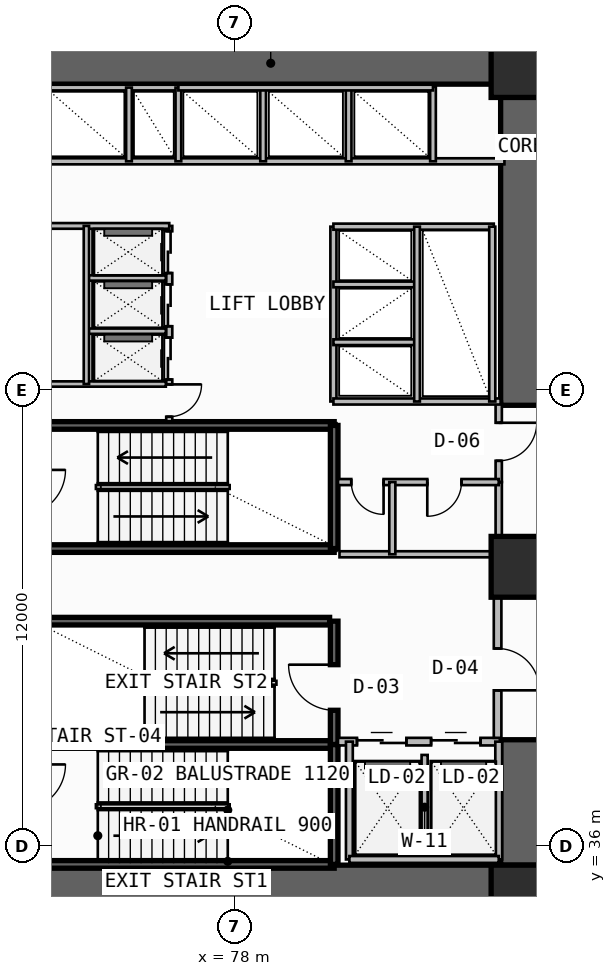
"""IFC4 building model, lengths in metres.
Left out: names, types, materials, properties, quantities, classifications, styles, units other than length and angle.
Written with IfcOpenShell. Run it as: python <this file> out.ifc"""

import sys

from ifc_helpers import new_model, si_unit, direction, frame, frame_2d, origin, origin_2d, place, context, subcontext, project, spatial, rectangle, extrude, element, fill, save


model = new_model("IFC4")
c1 = context("Model", 3, precision=1e-05, world=origin(), true_north=direction((0.0, 1.0)))
c2 = subcontext(c1, "Body", "Model", "MODEL_VIEW")
j1 = project(units=[si_unit("LENGTHUNIT", "METRE"), si_unit("PLANEANGLEUNIT", "RADIAN")], contexts=[c1])
p1 = place(None, origin())
s1 = spatial("IfcSite", under=j1, at=p1, CompositionType="ELEMENT")
p2 = place(p1, origin())
s2 = spatial("IfcBuilding", under=s1, at=p2, CompositionType="ELEMENT")
p3 = place(p2, frame((0.0, 0.0, 4.5)))
s3 = spatial("IfcBuildingStorey", under=s2, at=p3, CompositionType="ELEMENT", Elevation=4.5)
p4 = place(p3, frame((71.8, 34.95, -0.32), z_axis=(0.0, 0.0, 1.0), x_axis=(1.0, 0.0, 0.0)))
e1 = element("IfcWall", 1, at=p4, inside=s3, PredefinedType="SHEAR", context=c2, shape_type="SweptSolid", body=[
    extrude(rectangle(XDim=14.3, YDim=1.1, at=frame_2d((7.15, 0.0))), origin(), (0.0, 0.0, 1.0), 4.5),
])
p5 = place(p3, frame((85.55, 35.5, -0.32), z_axis=(0.0, 0.0, 1.0), x_axis=(0.0, 1.0, 0.0)))
e2 = element("IfcWall", 2, at=p5, inside=s3, PredefinedType="SHEAR", context=c2, shape_type="SweptSolid", body=[
    extrude(rectangle(XDim=3.3, YDim=1.1, at=frame_2d((1.65, 0.0))), origin(), (0.0, 0.0, 1.0), 4.5),
])
p6 = place(p3, frame((71.8, 56.6, -0.32), z_axis=(0.0, 0.0, 1.0), x_axis=(1.0, 0.0, 0.0)))
e3 = element("IfcWall", 3, at=p6, inside=s3, PredefinedType="SHEAR", context=c2, shape_type="SweptSolid", body=[
    extrude(rectangle(XDim=14.3, YDim=1.1, at=frame_2d((7.15, 0.0))), origin(), (0.0, 0.0, 1.0), 4.5),
])
p7 = place(p3, frame((85.55, 47.6, -0.32), z_axis=(0.0, 0.0, 1.0), x_axis=(0.0, 1.0, 0.0)))
e4 = element("IfcWall", 4, at=p7, inside=s3, PredefinedType="SHEAR", context=c2, shape_type="SweptSolid", body=[
    extrude(rectangle(XDim=8.45, YDim=1.1, at=frame_2d((4.225, 0.0))), origin(), (0.0, 0.0, 1.0), 4.5),
])
for number, where, z_axis, x_axis in (
    (5, (85.55, 34.7, 0.0), (0.0, 0.0, 1.0), (1.0, 0.0, 0.0)),
    (6, (85.55, 43.35, 0.0), (0.0, 0.0, 1.0), (1.0, 0.0, 0.0)),
    (7, (85.55, 56.5, 0.0), (0.0, 0.0, 1.0), (1.0, 0.0, 0.0)),
):
    element("IfcColumn", number, at=place(p3, frame(where, z_axis=z_axis, x_axis=x_axis)), inside=s3, PredefinedType="COLUMN", context=c2, shape_type="SweptSolid", body=[
        extrude(rectangle(XDim=1.6, YDim=1.6, at=origin_2d()), origin(), (0.0, 0.0, 1.0), 4.5),
    ])
for number, where, z_axis, x_axis in (
    (8, (72.92, 35.52, -0.32), (0.0, 0.0, 1.0), (1.0, 0.0, 0.0)),
    (9, (72.92, 38.675, -0.32), (0.0, 0.0, 1.0), (1.0, 0.0, 0.0)),
):
    element("IfcWall", number, at=place(p3, frame(where, z_axis=z_axis, x_axis=x_axis)), inside=s3, PredefinedType="SOLIDWALL", context=c2, shape_type="SweptSolid", body=[
        extrude(rectangle(XDim=7.7, YDim=0.2, at=frame_2d((3.85, 0.0))), origin(), (0.0, 0.0, 1.0), 4.5),
    ])
p8 = place(p3, frame((80.62, 35.52, -0.32), z_axis=(0.0, 0.0, 1.0), x_axis=(0.0, 1.0, 0.0)))
e10 = element("IfcWall", 10, at=p8, inside=s3, PredefinedType="SOLIDWALL", context=c2, shape_type="SweptSolid", body=[
    extrude(rectangle(XDim=3.155, YDim=0.2, at=frame_2d((1.578, 0.0))), origin(), (0.0, 0.0, 1.0), 4.5),
])
p9 = place(p3, frame((80.62, 38.675, -0.32), z_axis=(0.0, 0.0, 1.0), x_axis=(0.0, 1.0, 0.0)))
e11 = element("IfcWall", 11, at=p9, inside=s3, PredefinedType="SOLIDWALL", context=c2, shape_type="SweptSolid", body=[
    extrude(rectangle(XDim=3.245, YDim=0.2, at=frame_2d((1.623, 0.0))), origin(), (0.0, 0.0, 1.0), 4.5),
])
p10 = place(p9, frame((0.9, 0.0, 0.32)))
e12 = element("IfcOpeningElement", 12, at=p10, cuts=e11, PredefinedType="OPENING", context=c2, shape_type="SweptSolid", body=[
    extrude(rectangle(XDim=1.2, YDim=2.2, at=frame_2d((0.6, 1.1))), frame((0.0, 0.11, 0.0), z_axis=(0.0, -1.0, 0.0), x_axis=(1.0, 0.0, 0.0)), (0.0, 0.0, 1.0), 0.22),
])
p11 = place(p3, frame((80.72, 38.75, 0.0), z_axis=(0.0, 0.0, 1.0), x_axis=(1.0, 0.0, 0.0)))
e13 = element("IfcWall", 13, at=p11, inside=s3, PredefinedType="SOLIDWALL", context=c2, shape_type="SweptSolid", body=[
    extrude(rectangle(XDim=4.26, YDim=0.2, at=frame_2d((2.13, 0.0))), origin(), (0.0, 0.0, 1.0), 4.18),
])
p12 = place(p11, frame((0.5, 0.0, 0.0)))
e14 = element("IfcOpeningElement", 14, at=p12, cuts=e13, PredefinedType="OPENING", context=c2, shape_type="SweptSolid", body=[
    extrude(rectangle(XDim=1.3, YDim=2.3, at=frame_2d((0.65, 1.15))), frame((0.0, 0.11, 0.0), z_axis=(0.0, -1.0, 0.0), x_axis=(1.0, 0.0, 0.0)), (0.0, 0.0, 1.0), 0.22),
])
p13 = place(p11, frame((2.45, 0.0, 0.0)))
e15 = element("IfcOpeningElement", 15, at=p13, cuts=e13, PredefinedType="OPENING", context=c2, shape_type="SweptSolid", body=[
    extrude(rectangle(XDim=1.3, YDim=2.3, at=frame_2d((0.65, 1.15))), frame((0.0, 0.11, 0.0), z_axis=(0.0, -1.0, 0.0), x_axis=(1.0, 0.0, 0.0)), (0.0, 0.0, 1.0), 0.22),
])
p14 = place(p3, frame((83.0, 35.65, 0.0), z_axis=(0.0, 0.0, 1.0), x_axis=(0.0, 1.0, 0.0)))
e16 = element("IfcWall", 16, at=p14, inside=s3, PredefinedType="PLUMBINGWALL", context=c2, shape_type="SweptSolid", body=[
    extrude(rectangle(XDim=2.75, YDim=0.16, at=frame_2d((1.375, 0.0))), origin(), (0.0, 0.0, 1.0), 4.18),
])
for number, where, z_axis, x_axis in (
    (17, (84.95, 35.65, 0.0), (0.0, 0.0, 1.0), (0.0, 1.0, 0.0)),
    (18, (81.02, 35.65, 0.0), (0.0, 0.0, 1.0), (0.0, 1.0, 0.0)),
):
    element("IfcWall", number, at=place(p3, frame(where, z_axis=z_axis, x_axis=x_axis)), inside=s3, PredefinedType="SOLIDWALL", context=c2, shape_type="SweptSolid", body=[
        extrude(rectangle(XDim=3.1, YDim=0.18, at=frame_2d((1.55, 0.0))), origin(), (0.0, 0.0, 1.0), 4.18),
    ])
p15 = place(p3, frame((81.02, 35.65, 0.0), z_axis=(0.0, 0.0, 1.0), x_axis=(1.0, 0.0, 0.0)))
e19 = element("IfcWall", 19, at=p15, inside=s3, PredefinedType="SOLIDWALL", context=c2, shape_type="SweptSolid", body=[
    extrude(rectangle(XDim=3.93, YDim=0.18, at=frame_2d((1.965, 0.0))), origin(), (0.0, 0.0, 1.0), 4.18),
])
p16 = place(p3, frame((84.92, 38.85, 0.0), z_axis=(0.0, 0.0, 1.0), x_axis=(0.0, 1.0, 0.0)))
e20 = element("IfcWall", 20, at=p16, inside=s3, PredefinedType="SOLIDWALL", context=c2, shape_type="SweptSolid", body=[
    extrude(rectangle(XDim=4.83, YDim=0.2, at=frame_2d((2.415, 0.0))), origin(), (0.0, 0.0, 1.0), 4.18),
])
p17 = place(p16, frame((1.25, 0.0, 0.0)))
e21 = element("IfcOpeningElement", 21, at=p17, cuts=e20, PredefinedType="OPENING", context=c2, shape_type="SweptSolid", body=[
    extrude(rectangle(XDim=1.1, YDim=2.2, at=frame_2d((0.55, 1.1))), frame((0.0, 0.11, 0.0), z_axis=(0.0, -1.0, 0.0), x_axis=(1.0, 0.0, 0.0)), (0.0, 0.0, 1.0), 0.22),
])
p18 = place(p3, frame((72.92, 41.92, -0.32), z_axis=(0.0, 0.0, 1.0), x_axis=(1.0, 0.0, 0.0)))
e22 = element("IfcWall", 22, at=p18, inside=s3, PredefinedType="SOLIDWALL", context=c2, shape_type="SweptSolid", body=[
    extrude(rectangle(XDim=7.58, YDim=0.2, at=frame_2d((3.79, 0.0))), origin(), (0.0, 0.0, 1.0), 4.5),
])
for number, where, z_axis, x_axis in (
    (23, (72.92, 43.83, -0.32), (0.0, 0.0, 1.0), (1.0, 0.0, 0.0)),
    (24, (72.92, 47.07, -0.32), (0.0, 0.0, 1.0), (1.0, 0.0, 0.0)),
):
    element("IfcWall", number, at=place(p3, frame(where, z_axis=z_axis, x_axis=x_axis)), inside=s3, PredefinedType="SOLIDWALL", context=c2, shape_type="SweptSolid", body=[
        extrude(rectangle(XDim=7.7, YDim=0.2, at=frame_2d((3.85, 0.0))), origin(), (0.0, 0.0, 1.0), 4.5),
    ])
p19 = place(p3, frame((80.62, 43.83, -0.32), z_axis=(0.0, 0.0, 1.0), x_axis=(0.0, 1.0, 0.0)))
e25 = element("IfcWall", 25, at=p19, inside=s3, PredefinedType="SOLIDWALL", context=c2, shape_type="SweptSolid", body=[
    extrude(rectangle(XDim=3.24, YDim=0.2, at=frame_2d((1.62, 0.0))), origin(), (0.0, 0.0, 1.0), 4.5),
])
p20 = place(p3, frame((84.95, 43.68, 0.0), z_axis=(0.0, 0.0, 1.0), x_axis=(0.0, 1.0, 0.0)))
e26 = element("IfcWall", 26, at=p20, inside=s3, PredefinedType="PLUMBINGWALL", context=c2, shape_type="SweptSolid", body=[
    extrude(rectangle(XDim=1.9, YDim=0.165, at=frame_2d((0.95, 0.0))), origin(), (0.0, 0.0, 1.0), 4.18),
])
p21 = place(p3, frame((84.95, 45.58, 0.0), z_axis=(0.0, 0.0, 1.0), x_axis=(0.0, 1.0, 0.0)))
e27 = element("IfcWall", 27, at=p21, inside=s3, PredefinedType="PARTITIONING", context=c2, shape_type="SweptSolid", body=[
    extrude(rectangle(XDim=2.12, YDim=0.165, at=frame_2d((1.06, 0.0))), origin(), (0.0, 0.0, 1.0), 4.18),
])
p22 = place(p21, frame((0.56, 0.0, 0.0)))
e28 = element("IfcOpeningElement", 28, at=p22, cuts=e27, PredefinedType="OPENING", context=c2, shape_type="SweptSolid", body=[
    extrude(rectangle(XDim=1.0, YDim=2.2, at=frame_2d((0.5, 1.1))), frame((0.0, 0.093, 0.0), z_axis=(0.0, -1.0, 0.0), x_axis=(1.0, 0.0, 0.0)), (0.0, 0.0, 1.0), 0.185),
])
p23 = place(p3, frame((80.72, 45.58, 0.0), z_axis=(0.0, 0.0, 1.0), x_axis=(1.0, 0.0, 0.0)))
e29 = element("IfcWall", 29, at=p23, inside=s3, PredefinedType="PLUMBINGWALL", context=c2, shape_type="SweptSolid", body=[
    extrude(rectangle(XDim=4.23, YDim=0.16, at=frame_2d((2.115, 0.0))), origin(), (0.0, 0.0, 1.0), 4.18),
])
p24 = place(p23, frame((0.35, 0.0, 0.0)))
e30 = element("IfcOpeningElement", 30, at=p24, cuts=e29, PredefinedType="OPENING", context=c2, shape_type="SweptSolid", body=[
    extrude(rectangle(XDim=0.85, YDim=2.05, at=frame_2d((0.425, 1.025))), frame((0.0, 0.09, 0.0), z_axis=(0.0, -1.0, 0.0), x_axis=(1.0, 0.0, 0.0)), (0.0, 0.0, 1.0), 0.18),
])
p25 = place(p23, frame((2.35, 0.0, 0.0)))
e31 = element("IfcOpeningElement", 31, at=p25, cuts=e29, PredefinedType="OPENING", context=c2, shape_type="SweptSolid", body=[
    extrude(rectangle(XDim=0.9, YDim=2.1, at=frame_2d((0.45, 1.05))), frame((0.0, 0.09, 0.0), z_axis=(0.0, -1.0, 0.0), x_axis=(1.0, 0.0, 0.0)), (0.0, 0.0, 1.0), 0.18),
])
p26 = place(p3, frame((80.76, 43.68, 0.0), z_axis=(0.0, 0.0, 1.0), x_axis=(1.0, 0.0, 0.0)))
e32 = element("IfcWall", 32, at=p26, inside=s3, PredefinedType="PLUMBINGWALL", context=c2, shape_type="SweptSolid", body=[
    extrude(rectangle(XDim=4.19, YDim=0.16, at=frame_2d((2.095, 0.0))), origin(), (0.0, 0.0, 1.0), 4.18),
])
p27 = place(p3, frame((82.15, 43.68, 0.0), z_axis=(0.0, 0.0, 1.0), x_axis=(0.0, 1.0, 0.0)))
e33 = element("IfcWall", 33, at=p27, inside=s3, PredefinedType="PLUMBINGWALL", context=c2, shape_type="SweptSolid", body=[
    extrude(rectangle(XDim=1.9, YDim=0.16, at=frame_2d((0.95, 0.0))), origin(), (0.0, 0.0, 1.0), 4.18),
])
p28 = place(p3, frame((76.28, 47.18, 0.0), z_axis=(0.0, 0.0, 1.0), x_axis=(0.0, 1.0, 0.0)))
e34 = element("IfcWall", 34, at=p28, inside=s3, PredefinedType="SOLIDWALL", context=c2, shape_type="SweptSolid", body=[
    extrude(rectangle(XDim=5.14, YDim=0.16, at=frame_2d((2.57, 0.0))), origin(), (0.0, 0.0, 1.0), 4.18),
])
p29 = place(p28, frame((1.1, 0.0, 0.0)))
e35 = element("IfcOpeningElement", 35, at=p29, cuts=e34, PredefinedType="OPENING", context=c2, shape_type="SweptSolid", body=[
    extrude(rectangle(XDim=1.1, YDim=2.25, at=frame_2d((0.55, 1.125))), frame((0.0, 0.09, 0.0), z_axis=(0.0, -1.0, 0.0), x_axis=(1.0, 0.0, 0.0)), (0.0, 0.0, 1.0), 0.18),
])
p30 = place(p28, frame((2.5, 0.0, 0.0)))
e36 = element("IfcOpeningElement", 36, at=p30, cuts=e34, PredefinedType="OPENING", context=c2, shape_type="SweptSolid", body=[
    extrude(rectangle(XDim=1.1, YDim=2.25, at=frame_2d((0.55, 1.125))), frame((0.0, 0.09, 0.0), z_axis=(0.0, -1.0, 0.0), x_axis=(1.0, 0.0, 0.0)), (0.0, 0.0, 1.0), 0.18),
])
p31 = place(p28, frame((3.9, 0.0, 0.0)))
e37 = element("IfcOpeningElement", 37, at=p31, cuts=e34, PredefinedType="OPENING", context=c2, shape_type="SweptSolid", body=[
    extrude(rectangle(XDim=1.1, YDim=2.25, at=frame_2d((0.55, 1.125))), frame((0.0, 0.09, 0.0), z_axis=(0.0, -1.0, 0.0), x_axis=(1.0, 0.0, 0.0)), (0.0, 0.0, 1.0), 0.18),
])
p32 = place(p28, frame((0.12, 0.0, 0.0)))
e38 = element("IfcOpeningElement", 38, at=p32, cuts=e34, PredefinedType="OPENING", context=c2, shape_type="SweptSolid", body=[
    extrude(rectangle(XDim=0.85, YDim=2.05, at=frame_2d((0.425, 1.025))), frame((0.0, 0.09, 0.0), z_axis=(0.0, -1.0, 0.0), x_axis=(1.0, 0.0, 0.0)), (0.0, 0.0, 1.0), 0.18),
])
p33 = place(p3, frame((72.95, 52.32, 0.0), z_axis=(0.0, 0.0, 1.0), x_axis=(1.0, 0.0, 0.0)))
e39 = element("IfcWall", 39, at=p33, inside=s3, PredefinedType="SOLIDWALL", context=c2, shape_type="SweptSolid", body=[
    extrude(rectangle(XDim=3.33, YDim=0.15, at=frame_2d((1.665, 0.0))), origin(), (0.0, 0.0, 1.0), 4.18),
])
p34 = place(p3, frame((72.95, 48.16, 0.0), z_axis=(0.0, 0.0, 1.0), x_axis=(1.0, 0.0, 0.0)))
e40 = element("IfcWall", 40, at=p34, inside=s3, PredefinedType="PLUMBINGWALL", context=c2, shape_type="SweptSolid", body=[
    extrude(rectangle(XDim=3.24, YDim=0.14, at=frame_2d((1.62, 0.0))), origin(), (0.0, 0.0, 1.0), 4.18),
])
for number, where, z_axis, x_axis in (
    (41, (74.15, 49.55, 0.0), (0.0, 0.0, 1.0), (1.0, 0.0, 0.0)),
    (42, (74.15, 50.95, 0.0), (0.0, 0.0, 1.0), (1.0, 0.0, 0.0)),
):
    element("IfcWall", number, at=place(p3, frame(where, z_axis=z_axis, x_axis=x_axis)), inside=s3, PredefinedType="PLUMBINGWALL", context=c2, shape_type="SweptSolid", body=[
        extrude(rectangle(XDim=2.04, YDim=0.14, at=frame_2d((1.02, 0.0))), origin(), (0.0, 0.0, 1.0), 4.18),
    ])
p35 = place(p3, frame((74.1, 48.16, 0.0), z_axis=(0.0, 0.0, 1.0), x_axis=(0.0, 1.0, 0.0)))
e43 = element("IfcWall", 43, at=p35, inside=s3, PredefinedType="PLUMBINGWALL", context=c2, shape_type="SweptSolid", body=[
    extrude(rectangle(XDim=4.16, YDim=0.14, at=frame_2d((2.08, 0.0))), origin(), (0.0, 0.0, 1.0), 4.18),
])
p36 = place(p3, frame((80.6, 47.7, 0.0), z_axis=(0.0, 0.0, 1.0), x_axis=(0.0, 1.0, 0.0)))
e44 = element("IfcWall", 44, at=p36, inside=s3, PredefinedType="SOLIDWALL", context=c2, shape_type="SweptSolid", body=[
    extrude(rectangle(XDim=4.6, YDim=0.16, at=frame_2d((2.3, 0.0))), origin(), (0.0, 0.0, 1.0), 4.18),
])
p37 = place(p3, frame((80.6, 47.7, 0.0), z_axis=(0.0, 0.0, 1.0), x_axis=(1.0, 0.0, 0.0)))
e45 = element("IfcWall", 45, at=p37, inside=s3, PredefinedType="SOLIDWALL", context=c2, shape_type="SweptSolid", body=[
    extrude(rectangle(XDim=4.4, YDim=0.16, at=frame_2d((2.2, 0.0))), origin(), (0.0, 0.0, 1.0), 4.18),
])
p38 = place(p3, frame((80.6, 52.3, 0.0), z_axis=(0.0, 0.0, 1.0), x_axis=(1.0, 0.0, 0.0)))
e46 = element("IfcWall", 46, at=p38, inside=s3, PredefinedType="SOLIDWALL", context=c2, shape_type="SweptSolid", body=[
    extrude(rectangle(XDim=4.22, YDim=0.16, at=frame_2d((2.11, 0.0))), origin(), (0.0, 0.0, 1.0), 4.18),
])
for number, where, z_axis, x_axis in (
    (47, (80.6, 49.26, 0.0), (0.0, 0.0, 1.0), (1.0, 0.0, 0.0)),
    (48, (80.6, 50.78, 0.0), (0.0, 0.0, 1.0), (1.0, 0.0, 0.0)),
):
    element("IfcWall", number, at=place(p3, frame(where, z_axis=z_axis, x_axis=x_axis)), inside=s3, PredefinedType="PLUMBINGWALL", context=c2, shape_type="SweptSolid", body=[
        extrude(rectangle(XDim=2.2, YDim=0.15, at=frame_2d((1.1, 0.0))), origin(), (0.0, 0.0, 1.0), 4.18),
    ])
p39 = place(p3, frame((82.8, 47.7, 0.0), z_axis=(0.0, 0.0, 1.0), x_axis=(0.0, 1.0, 0.0)))
e49 = element("IfcWall", 49, at=p39, inside=s3, PredefinedType="PLUMBINGWALL", context=c2, shape_type="SweptSolid", body=[
    extrude(rectangle(XDim=4.6, YDim=0.15, at=frame_2d((2.3, 0.0))), origin(), (0.0, 0.0, 1.0), 4.18),
])
p40 = place(p3, frame((84.78, 47.7, 0.0), z_axis=(0.0, 0.0, 1.0), x_axis=(0.0, 1.0, 0.0)))
e50 = element("IfcWall", 50, at=p40, inside=s3, PredefinedType="SOLIDWALL", context=c2, shape_type="SweptSolid", body=[
    extrude(rectangle(XDim=4.6, YDim=0.16, at=frame_2d((2.3, 0.0))), origin(), (0.0, 0.0, 1.0), 4.18),
])
p41 = place(p3, frame((73.02, 54.02, 0.0), z_axis=(0.0, 0.0, 1.0), x_axis=(1.0, 0.0, 0.0)))
e51 = element("IfcWall", 51, at=p41, inside=s3, PredefinedType="SOLIDWALL", context=c2, shape_type="SweptSolid", body=[
    extrude(rectangle(XDim=12.08, YDim=0.16, at=frame_2d((6.04, 0.0))), origin(), (0.0, 0.0, 1.0), 4.18),
])
p42 = place(p3, frame((73.02, 55.96, 0.0), z_axis=(0.0, 0.0, 1.0), x_axis=(1.0, 0.0, 0.0)))
e52 = element("IfcWall", 52, at=p42, inside=s3, PredefinedType="SOLIDWALL", context=c2, shape_type="SweptSolid", body=[
    extrude(rectangle(XDim=3.5, YDim=0.15, at=frame_2d((1.75, 0.0))), origin(), (0.0, 0.0, 1.0), 4.18),
])
p43 = place(p3, frame((76.52, 54.02, 0.0), z_axis=(0.0, 0.0, 1.0), x_axis=(0.0, 1.0, 0.0)))
e53 = element("IfcWall", 53, at=p43, inside=s3, PredefinedType="SOLIDWALL", context=c2, shape_type="SweptSolid", body=[
    extrude(rectangle(XDim=1.94, YDim=0.15, at=frame_2d((0.97, 0.0))), origin(), (0.0, 0.0, 1.0), 4.18),
])
p44 = place(p3, frame((75.22, 54.02, 0.0), z_axis=(0.0, 0.0, 1.0), x_axis=(0.0, 1.0, 0.0)))
e54 = element("IfcWall", 54, at=p44, inside=s3, PredefinedType="PLUMBINGWALL", context=c2, shape_type="SweptSolid", body=[
    extrude(rectangle(XDim=1.94, YDim=0.15, at=frame_2d((0.97, 0.0))), origin(), (0.0, 0.0, 1.0), 4.18),
])
for number, where, z_axis, x_axis in (
    (55, (78.75, 54.02, 0.0), (0.0, 0.0, 1.0), (0.0, 1.0, 0.0)),
    (56, (81.0, 54.02, 0.0), (0.0, 0.0, 1.0), (0.0, 1.0, 0.0)),
):
    element("IfcWall", number, at=place(p3, frame(where, z_axis=z_axis, x_axis=x_axis)), inside=s3, PredefinedType="PLUMBINGWALL", context=c2, shape_type="SweptSolid", body=[
        extrude(rectangle(XDim=1.96, YDim=0.15, at=frame_2d((0.98, 0.0))), origin(), (0.0, 0.0, 1.0), 4.18),
    ])
p45 = place(p3, frame((83.22, 54.02, 0.0), z_axis=(0.0, 0.0, 1.0), x_axis=(0.0, 1.0, 0.0)))
e57 = element("IfcWall", 57, at=p45, inside=s3, PredefinedType="SOLIDWALL", context=c2, shape_type="SweptSolid", body=[
    extrude(rectangle(XDim=1.96, YDim=0.15, at=frame_2d((0.98, 0.0))), origin(), (0.0, 0.0, 1.0), 4.18),
])
p46 = place(p3, frame((76.52, 55.96, 0.0), z_axis=(0.0, 0.0, 1.0), x_axis=(1.0, 0.0, 0.0)))
e58 = element("IfcWall", 58, at=p46, inside=s3, PredefinedType="SOLIDWALL", context=c2, shape_type="SweptSolid", body=[
    extrude(rectangle(XDim=6.7, YDim=0.15, at=frame_2d((3.35, 0.0))), origin(), (0.0, 0.0, 1.0), 4.18),
])
p47 = place(p10, origin())
e59 = element("IfcDoor", 59, at=p47, inside=s3, OperationType="SINGLE_SWING_RIGHT", PredefinedType="USERDEFINED", context=c2, shape_type="SweptSolid", body=[
    extrude(rectangle(XDim=1.2, YDim=2.2, at=frame_2d((0.6, 1.1))), frame((0.0, 0.025, 0.0), z_axis=(0.0, -1.0, 0.0), x_axis=(1.0, 0.0, 0.0)), (0.0, 0.0, 1.0), 0.05),
])
fill(e12, e59)
p48 = place(p12, origin())
e60 = element("IfcDoor", 60, at=p48, inside=s3, OperationType="DOUBLE_DOOR_SLIDING", PredefinedType="DOOR", context=c2, shape_type="SweptSolid", body=[
    extrude(rectangle(XDim=1.3, YDim=2.3, at=frame_2d((0.65, 1.15))), frame((0.0, 0.025, 0.0), z_axis=(0.0, -1.0, 0.0), x_axis=(1.0, 0.0, 0.0)), (0.0, 0.0, 1.0), 0.05),
])
fill(e14, e60)
p49 = place(p13, origin())
e61 = element("IfcDoor", 61, at=p49, inside=s3, OperationType="DOUBLE_DOOR_SLIDING", PredefinedType="DOOR", context=c2, shape_type="SweptSolid", body=[
    extrude(rectangle(XDim=1.3, YDim=2.3, at=frame_2d((0.65, 1.15))), frame((0.0, 0.025, 0.0), z_axis=(0.0, -1.0, 0.0), x_axis=(1.0, 0.0, 0.0)), (0.0, 0.0, 1.0), 0.05),
])
fill(e15, e61)
p50 = place(p17, frame((1.1, 0.0, 0.0), z_axis=(0.0, 0.0, 1.0), x_axis=(-1.0, 0.0, 0.0)))
e62 = element("IfcDoor", 62, at=p50, inside=s3, OperationType="SINGLE_SWING_RIGHT", PredefinedType="DOOR", context=c2, shape_type="SweptSolid", body=[
    extrude(rectangle(XDim=1.1, YDim=2.2, at=frame_2d((0.55, 1.1))), frame((0.0, 0.025, 0.0), z_axis=(0.0, -1.0, 0.0), x_axis=(1.0, 0.0, 0.0)), (0.0, 0.0, 1.0), 0.05),
])
fill(e21, e62)
p51 = place(p22, frame((1.0, 0.0, 0.0), z_axis=(0.0, 0.0, 1.0), x_axis=(-1.0, 0.0, 0.0)))
e63 = element("IfcDoor", 63, at=p51, inside=s3, OperationType="SINGLE_SWING_LEFT", PredefinedType="DOOR", context=c2, shape_type="SweptSolid", body=[
    extrude(rectangle(XDim=1.0, YDim=2.2, at=frame_2d((0.5, 1.1))), frame((0.0, 0.025, 0.0), z_axis=(0.0, -1.0, 0.0), x_axis=(1.0, 0.0, 0.0)), (0.0, 0.0, 1.0), 0.05),
])
fill(e28, e63)
p52 = place(p24, frame((0.85, 0.0, 0.0), z_axis=(0.0, 0.0, 1.0), x_axis=(-1.0, 0.0, 0.0)))
e64 = element("IfcDoor", 64, at=p52, inside=s3, OperationType="SINGLE_SWING_LEFT", PredefinedType="DOOR", context=c2, shape_type="SweptSolid", body=[
    extrude(rectangle(XDim=0.85, YDim=2.05, at=frame_2d((0.425, 1.025))), frame((0.0, 0.025, 0.0), z_axis=(0.0, -1.0, 0.0), x_axis=(1.0, 0.0, 0.0)), (0.0, 0.0, 1.0), 0.05),
])
fill(e30, e64)
p53 = place(p25, frame((0.9, 0.0, 0.0), z_axis=(0.0, 0.0, 1.0), x_axis=(-1.0, 0.0, 0.0)))
e65 = element("IfcDoor", 65, at=p53, inside=s3, OperationType="SINGLE_SWING_RIGHT", PredefinedType="DOOR", context=c2, shape_type="SweptSolid", body=[
    extrude(rectangle(XDim=0.9, YDim=2.1, at=frame_2d((0.45, 1.05))), frame((0.0, 0.025, 0.0), z_axis=(0.0, -1.0, 0.0), x_axis=(1.0, 0.0, 0.0)), (0.0, 0.0, 1.0), 0.05),
])
fill(e31, e65)
p54 = place(p29, origin())
e66 = element("IfcDoor", 66, at=p54, inside=s3, OperationType="DOUBLE_DOOR_SLIDING", PredefinedType="DOOR", context=c2, shape_type="SweptSolid", body=[
    extrude(rectangle(XDim=1.1, YDim=2.25, at=frame_2d((0.55, 1.125))), frame((0.0, 0.025, 0.0), z_axis=(0.0, -1.0, 0.0), x_axis=(1.0, 0.0, 0.0)), (0.0, 0.0, 1.0), 0.05),
])
fill(e35, e66)
p55 = place(p30, origin())
e67 = element("IfcDoor", 67, at=p55, inside=s3, OperationType="DOUBLE_DOOR_SLIDING", PredefinedType="DOOR", context=c2, shape_type="SweptSolid", body=[
    extrude(rectangle(XDim=1.1, YDim=2.25, at=frame_2d((0.55, 1.125))), frame((0.0, 0.025, 0.0), z_axis=(0.0, -1.0, 0.0), x_axis=(1.0, 0.0, 0.0)), (0.0, 0.0, 1.0), 0.05),
])
fill(e36, e67)
p56 = place(p31, origin())
e68 = element("IfcDoor", 68, at=p56, inside=s3, OperationType="DOUBLE_DOOR_SLIDING", PredefinedType="DOOR", context=c2, shape_type="SweptSolid", body=[
    extrude(rectangle(XDim=1.1, YDim=2.25, at=frame_2d((0.55, 1.125))), frame((0.0, 0.025, 0.0), z_axis=(0.0, -1.0, 0.0), x_axis=(1.0, 0.0, 0.0)), (0.0, 0.0, 1.0), 0.05),
])
fill(e37, e68)
p57 = place(p32, frame((0.85, 0.0, 0.0), z_axis=(0.0, 0.0, 1.0), x_axis=(-1.0, 0.0, 0.0)))
e69 = element("IfcDoor", 69, at=p57, inside=s3, OperationType="SINGLE_SWING_LEFT", PredefinedType="DOOR", context=c2, shape_type="SweptSolid", body=[
    extrude(rectangle(XDim=0.85, YDim=2.05, at=frame_2d((0.425, 1.025))), frame((0.0, 0.025, 0.0), z_axis=(0.0, -1.0, 0.0), x_axis=(1.0, 0.0, 0.0)), (0.0, 0.0, 1.0), 0.05),
])
fill(e38, e69)
save(model, sys.argv[1])
